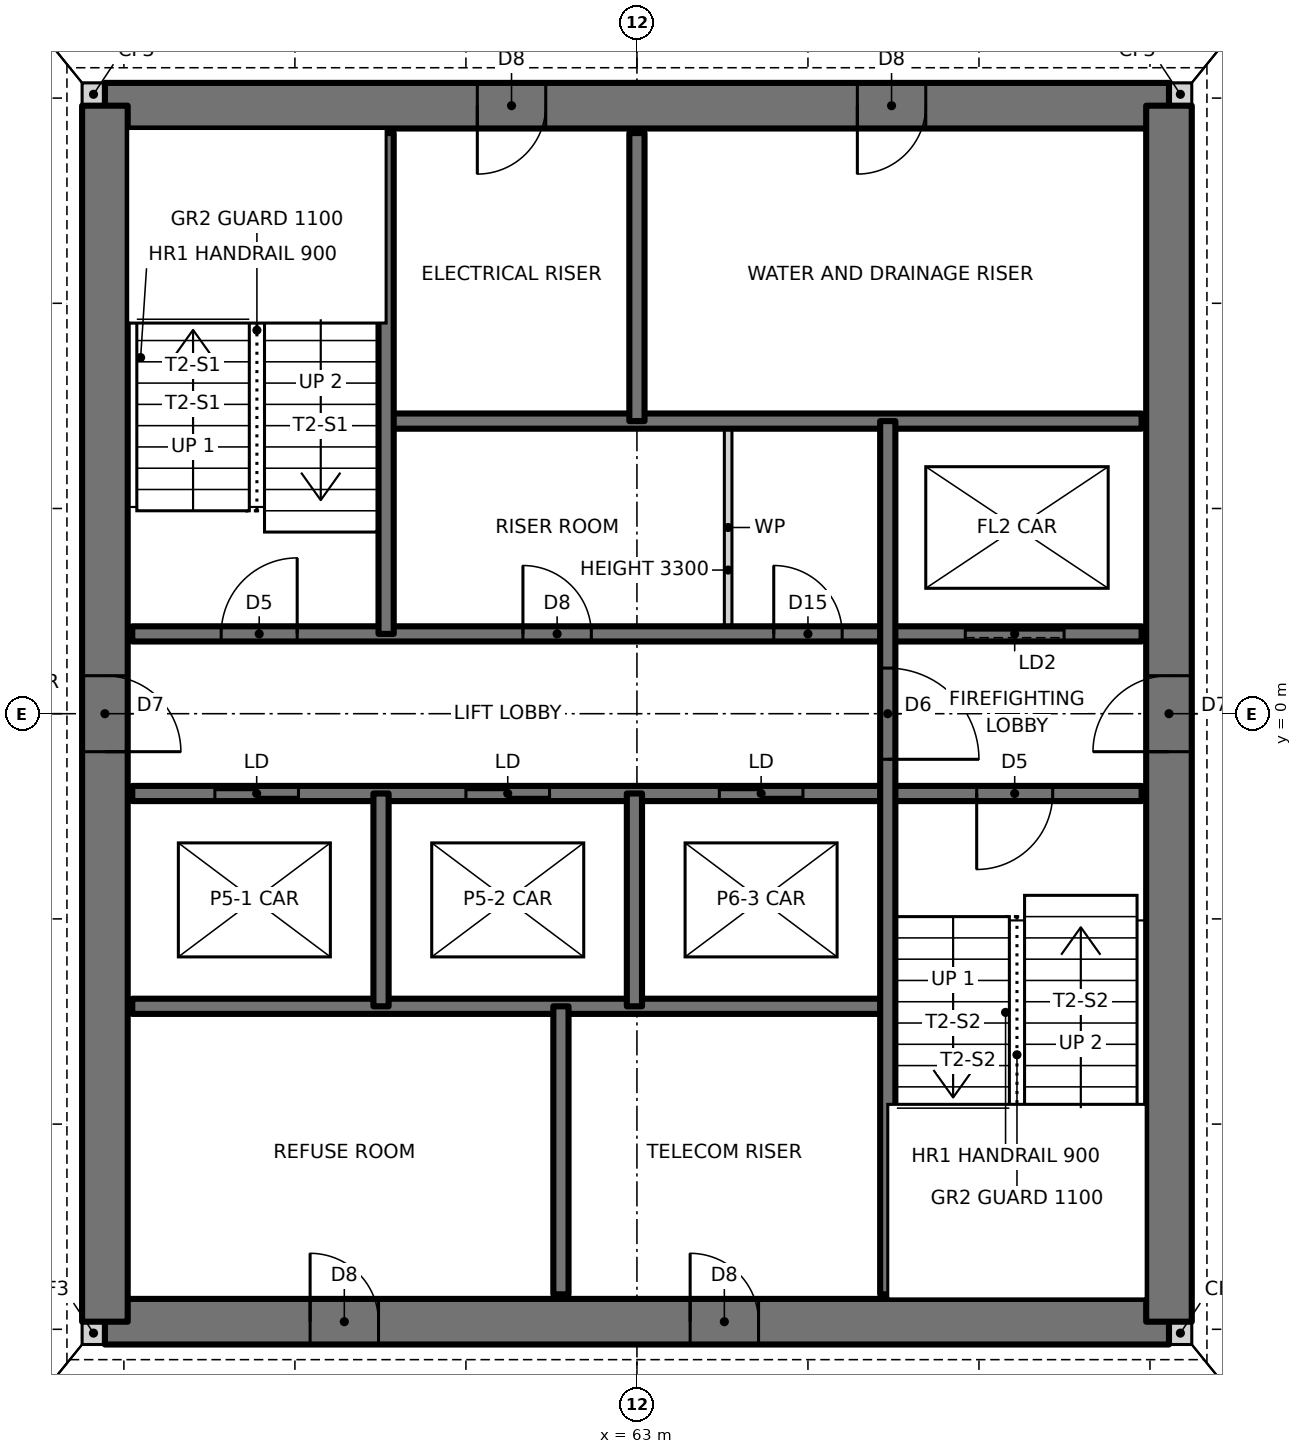
"""IFC4 building model, lengths in metres.
Left out: names, types, materials, properties, quantities, classifications, styles, units other than length and angle.
Written with IfcOpenShell. Run it as: python <this file> out.ifc"""

import sys

from ifc_helpers import new_model, si_unit, direction, frame, frame_2d, origin, place, context, subcontext, project, spatial, rectangle, extrude, element, fill, save


model = new_model("IFC4")
c1 = context("Model", 3, precision=1e-05, world=origin(), true_north=direction((0.0, 1.0)))
c2 = subcontext(c1, "Body", "Model", "MODEL_VIEW")
j1 = project(units=[si_unit("LENGTHUNIT", "METRE"), si_unit("PLANEANGLEUNIT", "RADIAN")], contexts=[c1])
p1 = place(None, origin())
s1 = spatial("IfcSite", under=j1, at=p1, CompositionType="ELEMENT")
p2 = place(p1, origin())
s2 = spatial("IfcBuilding", under=s1, at=p2, CompositionType="ELEMENT")
p3 = place(p2, frame((0.0, 0.0, 122.5)))
s3 = spatial("IfcBuildingStorey", under=s2, at=p3, CompositionType="ELEMENT", Elevation=122.5)
for number, where, z_axis, x_axis in (
    (1, (55.7, -8.15, 0.0), (0.0, 0.0, 1.0), (1.0, 0.0, 0.0)),
    (2, (70.0, -8.15, 0.0), (0.0, 0.0, 1.0), (1.0, 0.0, 0.0)),
    (3, (70.0, 8.15, 0.0), (0.0, 0.0, 1.0), (1.0, 0.0, 0.0)),
    (4, (55.7, 8.15, 0.0), (0.0, 0.0, 1.0), (1.0, 0.0, 0.0)),
):
    element("IfcWall", number, at=place(p3, frame(where, z_axis=z_axis, x_axis=x_axis)), inside=s3, PredefinedType="SOLIDWALL", context=c2, shape_type="SweptSolid", body=[
        extrude(rectangle(XDim=0.3, YDim=0.3, at=frame_2d((0.15, 0.0))), origin(), (0.0, 0.0, 1.0), 3.5),
    ])
p4 = place(p3, frame((56.0, -8.0, 0.0), z_axis=(0.0, 0.0, 1.0), x_axis=(1.0, 0.0, 0.0)))
e5 = element("IfcWall", 5, at=p4, inside=s3, PredefinedType="SHEAR", context=c2, shape_type="SweptSolid", body=[
    extrude(rectangle(XDim=14.0, YDim=0.6, at=frame_2d((7.0, 0.0))), origin(), (0.0, 0.0, 1.0), 3.5),
])
p5 = place(p4, frame((2.7, 0.0, 0.0)))
e6 = element("IfcOpeningElement", 6, at=p5, cuts=e5, PredefinedType="OPENING", context=c2, shape_type="SweptSolid", body=[
    extrude(rectangle(XDim=0.9, YDim=2.1, at=frame_2d((0.45, 1.05))), frame((0.0, 0.31, 0.0), z_axis=(0.0, -1.0, 0.0), x_axis=(1.0, 0.0, 0.0)), (0.0, 0.0, 1.0), 0.62),
])
p6 = place(p4, frame((7.7, 0.0, 0.0)))
e7 = element("IfcOpeningElement", 7, at=p6, cuts=e5, PredefinedType="OPENING", context=c2, shape_type="SweptSolid", body=[
    extrude(rectangle(XDim=0.9, YDim=2.1, at=frame_2d((0.45, 1.05))), frame((0.0, 0.31, 0.0), z_axis=(0.0, -1.0, 0.0), x_axis=(1.0, 0.0, 0.0)), (0.0, 0.0, 1.0), 0.62),
])
p7 = place(p3, frame((70.0, 8.0, 0.0), z_axis=(0.0, 0.0, 1.0), x_axis=(-1.0, 0.0, 0.0)))
e8 = element("IfcWall", 8, at=p7, inside=s3, PredefinedType="SHEAR", context=c2, shape_type="SweptSolid", body=[
    extrude(rectangle(XDim=14.0, YDim=0.6, at=frame_2d((7.0, 0.0))), origin(), (0.0, 0.0, 1.0), 3.5),
])
p8 = place(p7, frame((8.2, 0.0, 0.0)))
e9 = element("IfcOpeningElement", 9, at=p8, cuts=e8, PredefinedType="OPENING", context=c2, shape_type="SweptSolid", body=[
    extrude(rectangle(XDim=0.9, YDim=2.1, at=frame_2d((0.45, 1.05))), frame((0.0, 0.31, 0.0), z_axis=(0.0, -1.0, 0.0), x_axis=(1.0, 0.0, 0.0)), (0.0, 0.0, 1.0), 0.62),
])
p9 = place(p7, frame((3.2, 0.0, 0.0)))
e10 = element("IfcOpeningElement", 10, at=p9, cuts=e8, PredefinedType="OPENING", context=c2, shape_type="SweptSolid", body=[
    extrude(rectangle(XDim=0.9, YDim=2.1, at=frame_2d((0.45, 1.05))), frame((0.0, 0.31, 0.0), z_axis=(0.0, -1.0, 0.0), x_axis=(1.0, 0.0, 0.0)), (0.0, 0.0, 1.0), 0.62),
])
p10 = place(p3, frame((70.0, -8.0, 0.0), z_axis=(0.0, 0.0, 1.0), x_axis=(0.0, 1.0, 0.0)))
e11 = element("IfcWall", 11, at=p10, inside=s3, PredefinedType="SHEAR", context=c2, shape_type="SweptSolid", body=[
    extrude(rectangle(XDim=16.0, YDim=0.6, at=frame_2d((8.0, 0.0))), origin(), (0.0, 0.0, 1.0), 3.5),
])
p11 = place(p10, frame((7.5, 0.0, 0.0)))
e12 = element("IfcOpeningElement", 12, at=p11, cuts=e11, PredefinedType="OPENING", context=c2, shape_type="SweptSolid", body=[
    extrude(rectangle(XDim=1.0, YDim=2.1, at=frame_2d((0.5, 1.05))), frame((0.0, 0.31, 0.0), z_axis=(0.0, -1.0, 0.0), x_axis=(1.0, 0.0, 0.0)), (0.0, 0.0, 1.0), 0.62),
])
p12 = place(p3, frame((56.0, 8.0, 0.0), z_axis=(0.0, 0.0, 1.0), x_axis=(0.0, -1.0, 0.0)))
e13 = element("IfcWall", 13, at=p12, inside=s3, PredefinedType="SHEAR", context=c2, shape_type="SweptSolid", body=[
    extrude(rectangle(XDim=16.0, YDim=0.6, at=frame_2d((8.0, 0.0))), origin(), (0.0, 0.0, 1.0), 3.5),
])
p13 = place(p12, frame((7.5, 0.0, 0.0)))
e14 = element("IfcOpeningElement", 14, at=p13, cuts=e13, PredefinedType="OPENING", context=c2, shape_type="SweptSolid", body=[
    extrude(rectangle(XDim=1.0, YDim=2.1, at=frame_2d((0.5, 1.05))), frame((0.0, 0.31, 0.0), z_axis=(0.0, -1.0, 0.0), x_axis=(1.0, 0.0, 0.0)), (0.0, 0.0, 1.0), 0.62),
])
p14 = place(p3, frame((56.36, -3.85, 0.0), z_axis=(0.0, 0.0, 1.0), x_axis=(1.0, 0.0, 0.0)))
e15 = element("IfcWall", 15, at=p14, inside=s3, PredefinedType="SOLIDWALL", context=c2, shape_type="SweptSolid", body=[
    extrude(rectangle(XDim=9.94, YDim=0.2, at=frame_2d((4.97, 0.0))), origin(), (0.0, 0.0, 1.0), 3.5),
])
p15 = place(p3, frame((56.36, -1.05, 0.0), z_axis=(0.0, 0.0, 1.0), x_axis=(1.0, 0.0, 0.0)))
e16 = element("IfcWall", 16, at=p15, inside=s3, PredefinedType="SOLIDWALL", context=c2, shape_type="SweptSolid", body=[
    extrude(rectangle(XDim=13.28, YDim=0.2, at=frame_2d((6.64, 0.0))), origin(), (0.0, 0.0, 1.0), 3.5),
])
p16 = place(p15, frame((11.11, 0.0, 0.0)))
e17 = element("IfcOpeningElement", 17, at=p16, cuts=e16, PredefinedType="OPENING", context=c2, shape_type="SweptSolid", body=[
    extrude(rectangle(XDim=1.0, YDim=2.1, at=frame_2d((0.5, 1.05))), frame((0.0, 0.11, 0.0), z_axis=(0.0, -1.0, 0.0), x_axis=(1.0, 0.0, 0.0)), (0.0, 0.0, 1.0), 0.22),
])
p17 = place(p15, frame((1.087, 0.0, 0.0)))
e18 = element("IfcOpeningElement", 18, at=p17, cuts=e16, PredefinedType="OPENING", context=c2, shape_type="SweptSolid", body=[
    extrude(rectangle(XDim=1.1, YDim=2.1, at=frame_2d((0.55, 1.05))), frame((0.0, 0.11, 0.0), z_axis=(0.0, -1.0, 0.0), x_axis=(1.0, 0.0, 0.0)), (0.0, 0.0, 1.0), 0.22),
])
p18 = place(p15, frame((4.39, 0.0, 0.0)))
e19 = element("IfcOpeningElement", 19, at=p18, cuts=e16, PredefinedType="OPENING", context=c2, shape_type="SweptSolid", body=[
    extrude(rectangle(XDim=1.1, YDim=2.1, at=frame_2d((0.55, 1.05))), frame((0.0, 0.11, 0.0), z_axis=(0.0, -1.0, 0.0), x_axis=(1.0, 0.0, 0.0)), (0.0, 0.0, 1.0), 0.22),
])
p19 = place(p15, frame((7.724, 0.0, 0.0)))
e20 = element("IfcOpeningElement", 20, at=p19, cuts=e16, PredefinedType="OPENING", context=c2, shape_type="SweptSolid", body=[
    extrude(rectangle(XDim=1.1, YDim=2.1, at=frame_2d((0.55, 1.05))), frame((0.0, 0.11, 0.0), z_axis=(0.0, -1.0, 0.0), x_axis=(1.0, 0.0, 0.0)), (0.0, 0.0, 1.0), 0.22),
])
p20 = place(p3, frame((56.36, 1.05, 0.0), z_axis=(0.0, 0.0, 1.0), x_axis=(1.0, 0.0, 0.0)))
e21 = element("IfcWall", 21, at=p20, inside=s3, PredefinedType="SOLIDWALL", context=c2, shape_type="SweptSolid", body=[
    extrude(rectangle(XDim=13.28, YDim=0.2, at=frame_2d((6.64, 0.0))), origin(), (0.0, 0.0, 1.0), 3.5),
])
p21 = place(p20, frame((1.17, 0.0, 0.0)))
e22 = element("IfcOpeningElement", 22, at=p21, cuts=e21, PredefinedType="OPENING", context=c2, shape_type="SweptSolid", body=[
    extrude(rectangle(XDim=1.0, YDim=2.1, at=frame_2d((0.5, 1.05))), frame((0.0, 0.11, 0.0), z_axis=(0.0, -1.0, 0.0), x_axis=(1.0, 0.0, 0.0)), (0.0, 0.0, 1.0), 0.22),
])
p22 = place(p20, frame((5.14, 0.0, 0.0)))
e23 = element("IfcOpeningElement", 23, at=p22, cuts=e21, PredefinedType="OPENING", context=c2, shape_type="SweptSolid", body=[
    extrude(rectangle(XDim=0.9, YDim=2.1, at=frame_2d((0.45, 1.05))), frame((0.0, 0.11, 0.0), z_axis=(0.0, -1.0, 0.0), x_axis=(1.0, 0.0, 0.0)), (0.0, 0.0, 1.0), 0.22),
])
p23 = place(p20, frame((8.44, 0.0, 0.0)))
e24 = element("IfcOpeningElement", 24, at=p23, cuts=e21, PredefinedType="OPENING", context=c2, shape_type="SweptSolid", body=[
    extrude(rectangle(XDim=0.9, YDim=2.1, at=frame_2d((0.45, 1.05))), frame((0.0, 0.11, 0.0), z_axis=(0.0, -1.0, 0.0), x_axis=(1.0, 0.0, 0.0)), (0.0, 0.0, 1.0), 0.22),
])
p24 = place(p20, frame((10.96, 0.0, 0.0)))
e25 = element("IfcOpeningElement", 25, at=p24, cuts=e21, PredefinedType="OPENING", context=c2, shape_type="SweptSolid", body=[
    extrude(rectangle(XDim=1.3, YDim=2.1, at=frame_2d((0.65, 1.05))), frame((0.0, 0.11, 0.0), z_axis=(0.0, -1.0, 0.0), x_axis=(1.0, 0.0, 0.0)), (0.0, 0.0, 1.0), 0.22),
])
p25 = place(p3, frame((59.7, 3.85, 0.0), z_axis=(0.0, 0.0, 1.0), x_axis=(1.0, 0.0, 0.0)))
e26 = element("IfcWall", 26, at=p25, inside=s3, PredefinedType="SOLIDWALL", context=c2, shape_type="SweptSolid", body=[
    extrude(rectangle(XDim=9.94, YDim=0.2, at=frame_2d((4.97, 0.0))), origin(), (0.0, 0.0, 1.0), 3.5),
])
p26 = place(p3, frame((66.3, -7.64, 0.0), z_axis=(0.0, 0.0, 1.0), x_axis=(0.0, 1.0, 0.0)))
e27 = element("IfcWall", 27, at=p26, inside=s3, PredefinedType="SOLIDWALL", context=c2, shape_type="SweptSolid", body=[
    extrude(rectangle(XDim=11.49, YDim=0.2, at=frame_2d((5.745, 0.0))), origin(), (0.0, 0.0, 1.0), 3.5),
])
p27 = place(p26, frame((7.04, 0.0, 0.0)))
e28 = element("IfcOpeningElement", 28, at=p27, cuts=e27, PredefinedType="OPENING", context=c2, shape_type="SweptSolid", body=[
    extrude(rectangle(XDim=1.2, YDim=2.1, at=frame_2d((0.6, 1.05))), frame((0.0, 0.11, 0.0), z_axis=(0.0, -1.0, 0.0), x_axis=(1.0, 0.0, 0.0)), (0.0, 0.0, 1.0), 0.22),
])
p28 = place(p3, frame((64.2, 1.05, 0.0), z_axis=(0.0, 0.0, 1.0), x_axis=(0.0, 1.0, 0.0)))
e29 = element("IfcWall", 29, at=p28, inside=s3, PredefinedType="PARTITIONING", context=c2, shape_type="SweptSolid", body=[
    extrude(rectangle(XDim=2.8, YDim=0.1, at=frame_2d((1.4, 0.0))), origin(), (0.0, 0.0, 1.0), 3.3),
])
p29 = place(p3, frame((63.0, 3.85, 0.0), z_axis=(0.0, 0.0, 1.0), x_axis=(0.0, 1.0, 0.0)))
e30 = element("IfcWall", 30, at=p29, inside=s3, PredefinedType="SOLIDWALL", context=c2, shape_type="SweptSolid", body=[
    extrude(rectangle(XDim=3.79, YDim=0.2, at=frame_2d((1.895, 0.0))), origin(), (0.0, 0.0, 1.0), 3.5),
])
p30 = place(p3, frame((62.967, -3.85, 0.0), z_axis=(0.0, 0.0, 1.0), x_axis=(0.0, 1.0, 0.0)))
e31 = element("IfcWall", 31, at=p30, inside=s3, PredefinedType="SOLIDWALL", context=c2, shape_type="SweptSolid", body=[
    extrude(rectangle(XDim=2.8, YDim=0.2, at=frame_2d((1.4, 0.0))), origin(), (0.0, 0.0, 1.0), 3.5),
])
p31 = place(p3, frame((62.0, -7.64, 0.0), z_axis=(0.0, 0.0, 1.0), x_axis=(0.0, 1.0, 0.0)))
e32 = element("IfcWall", 32, at=p31, inside=s3, PredefinedType="SOLIDWALL", context=c2, shape_type="SweptSolid", body=[
    extrude(rectangle(XDim=3.79, YDim=0.2, at=frame_2d((1.895, 0.0))), origin(), (0.0, 0.0, 1.0), 3.5),
])
p32 = place(p3, frame((59.7, 1.05, 0.0), z_axis=(0.0, 0.0, 1.0), x_axis=(0.0, 1.0, 0.0)))
e33 = element("IfcWall", 33, at=p32, inside=s3, PredefinedType="SOLIDWALL", context=c2, shape_type="SweptSolid", body=[
    extrude(rectangle(XDim=6.59, YDim=0.2, at=frame_2d((3.295, 0.0))), origin(), (0.0, 0.0, 1.0), 3.5),
])
p33 = place(p3, frame((59.633, -3.85, 0.0), z_axis=(0.0, 0.0, 1.0), x_axis=(0.0, 1.0, 0.0)))
e34 = element("IfcWall", 34, at=p33, inside=s3, PredefinedType="SOLIDWALL", context=c2, shape_type="SweptSolid", body=[
    extrude(rectangle(XDim=2.8, YDim=0.2, at=frame_2d((1.4, 0.0))), origin(), (0.0, 0.0, 1.0), 3.5),
])
p34 = place(p21, origin())
e35 = element("IfcDoor", 35, at=p34, inside=s3, OperationType="SINGLE_SWING_RIGHT", PredefinedType="DOOR", context=c2, shape_type="SweptSolid", body=[
    extrude(rectangle(XDim=1.0, YDim=2.1, at=frame_2d((0.5, 1.05))), frame((0.0, 0.025, 0.0), z_axis=(0.0, -1.0, 0.0), x_axis=(1.0, 0.0, 0.0)), (0.0, 0.0, 1.0), 0.05),
])
fill(e22, e35)
p35 = place(p16, frame((1.0, 0.0, 0.0), z_axis=(0.0, 0.0, 1.0), x_axis=(-1.0, 0.0, 0.0)))
e36 = element("IfcDoor", 36, at=p35, inside=s3, OperationType="SINGLE_SWING_RIGHT", PredefinedType="DOOR", context=c2, shape_type="SweptSolid", body=[
    extrude(rectangle(XDim=1.0, YDim=2.1, at=frame_2d((0.5, 1.05))), frame((0.0, 0.025, 0.0), z_axis=(0.0, -1.0, 0.0), x_axis=(1.0, 0.0, 0.0)), (0.0, 0.0, 1.0), 0.05),
])
fill(e17, e36)
p36 = place(p27, frame((1.2, 0.0, 0.0), z_axis=(0.0, 0.0, 1.0), x_axis=(-1.0, 0.0, 0.0)))
e37 = element("IfcDoor", 37, at=p36, inside=s3, OperationType="SINGLE_SWING_RIGHT", PredefinedType="DOOR", context=c2, shape_type="SweptSolid", body=[
    extrude(rectangle(XDim=1.2, YDim=2.1, at=frame_2d((0.6, 1.05))), frame((0.0, 0.025, 0.0), z_axis=(0.0, -1.0, 0.0), x_axis=(1.0, 0.0, 0.0)), (0.0, 0.0, 1.0), 0.05),
])
fill(e28, e37)
p37 = place(p22, origin())
e38 = element("IfcDoor", 38, at=p37, inside=s3, OperationType="SINGLE_SWING_LEFT", PredefinedType="DOOR", context=c2, shape_type="SweptSolid", body=[
    extrude(rectangle(XDim=0.9, YDim=2.1, at=frame_2d((0.45, 1.05))), frame((0.0, 0.025, 0.0), z_axis=(0.0, -1.0, 0.0), x_axis=(1.0, 0.0, 0.0)), (0.0, 0.0, 1.0), 0.05),
])
fill(e23, e38)
p38 = place(p23, origin())
e39 = element("IfcDoor", 39, at=p38, inside=s3, OperationType="SINGLE_SWING_LEFT", PredefinedType="DOOR", context=c2, shape_type="SweptSolid", body=[
    extrude(rectangle(XDim=0.9, YDim=2.1, at=frame_2d((0.45, 1.05))), frame((0.0, 0.025, 0.0), z_axis=(0.0, -1.0, 0.0), x_axis=(1.0, 0.0, 0.0)), (0.0, 0.0, 1.0), 0.05),
])
fill(e24, e39)
p39 = place(p13, origin())
e40 = element("IfcDoor", 40, at=p39, inside=s3, OperationType="SINGLE_SWING_RIGHT", PredefinedType="DOOR", context=c2, shape_type="SweptSolid", body=[
    extrude(rectangle(XDim=1.0, YDim=2.1, at=frame_2d((0.5, 1.05))), frame((0.0, 0.025, 0.0), z_axis=(0.0, -1.0, 0.0), x_axis=(1.0, 0.0, 0.0)), (0.0, 0.0, 1.0), 0.05),
])
fill(e14, e40)
p40 = place(p11, origin())
e41 = element("IfcDoor", 41, at=p40, inside=s3, OperationType="SINGLE_SWING_LEFT", PredefinedType="DOOR", context=c2, shape_type="SweptSolid", body=[
    extrude(rectangle(XDim=1.0, YDim=2.1, at=frame_2d((0.5, 1.05))), frame((0.0, 0.025, 0.0), z_axis=(0.0, -1.0, 0.0), x_axis=(1.0, 0.0, 0.0)), (0.0, 0.0, 1.0), 0.05),
])
fill(e12, e41)
p41 = place(p8, origin())
e42 = element("IfcDoor", 42, at=p41, inside=s3, OperationType="SINGLE_SWING_RIGHT", PredefinedType="DOOR", context=c2, shape_type="SweptSolid", body=[
    extrude(rectangle(XDim=0.9, YDim=2.1, at=frame_2d((0.45, 1.05))), frame((0.0, 0.025, 0.0), z_axis=(0.0, -1.0, 0.0), x_axis=(1.0, 0.0, 0.0)), (0.0, 0.0, 1.0), 0.05),
])
fill(e9, e42)
p42 = place(p9, origin())
e43 = element("IfcDoor", 43, at=p42, inside=s3, OperationType="SINGLE_SWING_RIGHT", PredefinedType="DOOR", context=c2, shape_type="SweptSolid", body=[
    extrude(rectangle(XDim=0.9, YDim=2.1, at=frame_2d((0.45, 1.05))), frame((0.0, 0.025, 0.0), z_axis=(0.0, -1.0, 0.0), x_axis=(1.0, 0.0, 0.0)), (0.0, 0.0, 1.0), 0.05),
])
fill(e10, e43)
p43 = place(p5, origin())
e44 = element("IfcDoor", 44, at=p43, inside=s3, OperationType="SINGLE_SWING_LEFT", PredefinedType="DOOR", context=c2, shape_type="SweptSolid", body=[
    extrude(rectangle(XDim=0.9, YDim=2.1, at=frame_2d((0.45, 1.05))), frame((0.0, 0.025, 0.0), z_axis=(0.0, -1.0, 0.0), x_axis=(1.0, 0.0, 0.0)), (0.0, 0.0, 1.0), 0.05),
])
fill(e6, e44)
p44 = place(p6, origin())
e45 = element("IfcDoor", 45, at=p44, inside=s3, OperationType="SINGLE_SWING_LEFT", PredefinedType="DOOR", context=c2, shape_type="SweptSolid", body=[
    extrude(rectangle(XDim=0.9, YDim=2.1, at=frame_2d((0.45, 1.05))), frame((0.0, 0.025, 0.0), z_axis=(0.0, -1.0, 0.0), x_axis=(1.0, 0.0, 0.0)), (0.0, 0.0, 1.0), 0.05),
])
fill(e7, e45)
p45 = place(p17, origin())
e46 = element("IfcDoor", 46, at=p45, inside=s3, OperationType="DOUBLE_DOOR_SLIDING", PredefinedType="DOOR", context=c2, shape_type="SweptSolid", body=[
    extrude(rectangle(XDim=1.1, YDim=2.1, at=frame_2d((0.55, 1.05))), frame((0.0, 0.025, 0.0), z_axis=(0.0, -1.0, 0.0), x_axis=(1.0, 0.0, 0.0)), (0.0, 0.0, 1.0), 0.05),
])
fill(e18, e46)
p46 = place(p18, origin())
e47 = element("IfcDoor", 47, at=p46, inside=s3, OperationType="DOUBLE_DOOR_SLIDING", PredefinedType="DOOR", context=c2, shape_type="SweptSolid", body=[
    extrude(rectangle(XDim=1.1, YDim=2.1, at=frame_2d((0.55, 1.05))), frame((0.0, 0.025, 0.0), z_axis=(0.0, -1.0, 0.0), x_axis=(1.0, 0.0, 0.0)), (0.0, 0.0, 1.0), 0.05),
])
fill(e19, e47)
p47 = place(p19, origin())
e48 = element("IfcDoor", 48, at=p47, inside=s3, OperationType="DOUBLE_DOOR_SLIDING", PredefinedType="DOOR", context=c2, shape_type="SweptSolid", body=[
    extrude(rectangle(XDim=1.1, YDim=2.1, at=frame_2d((0.55, 1.05))), frame((0.0, 0.025, 0.0), z_axis=(0.0, -1.0, 0.0), x_axis=(1.0, 0.0, 0.0)), (0.0, 0.0, 1.0), 0.05),
])
fill(e20, e48)
p48 = place(p24, origin())
e49 = element("IfcDoor", 49, at=p48, inside=s3, OperationType="SLIDING_TO_LEFT", PredefinedType="DOOR", context=c2, shape_type="SweptSolid", body=[
    extrude(rectangle(XDim=1.3, YDim=2.1, at=frame_2d((0.65, 1.05))), frame((0.0, 0.025, 0.0), z_axis=(0.0, -1.0, 0.0), x_axis=(1.0, 0.0, 0.0)), (0.0, 0.0, 1.0), 0.05),
])
fill(e25, e49)
save(model, sys.argv[1])
